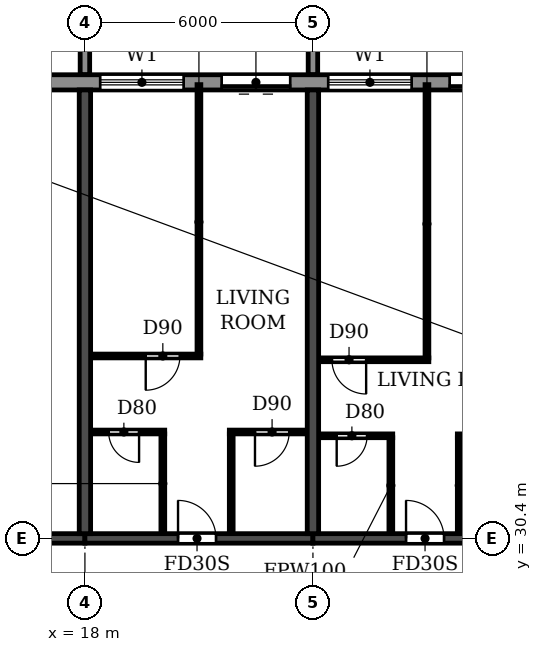
"""IFC4 building model, lengths in metres.
Left out: names, types, materials, properties, quantities, classifications, styles, units other than length and angle.
Written with IfcOpenShell. Run it as: python <this file> out.ifc"""

import sys

from ifc_helpers import new_model, si_unit, direction, frame, frame_2d, origin, place, context, subcontext, project, spatial, polyline, rectangle, outline, extrude, source, transform, mapped, element, fill, save


model = new_model("IFC4")
c1 = context("Model", 3, precision=1e-05, world=origin(), true_north=direction((0.0, 1.0)))
c2 = subcontext(c1, "Body", "Model", "MODEL_VIEW")
j1 = project(units=[si_unit("LENGTHUNIT", "METRE"), si_unit("PLANEANGLEUNIT", "RADIAN")], contexts=[c1])
p1 = place(None, origin())
s1 = spatial("IfcSite", under=j1, at=p1, CompositionType="ELEMENT")
p2 = place(p1, origin())
s2 = spatial("IfcBuilding", under=s1, at=p2, CompositionType="ELEMENT")
p3 = place(p2, frame((0.0, 0.0, 125.7)))
s3 = spatial("IfcBuildingStorey", under=s2, at=p3, CompositionType="ELEMENT", Elevation=125.7)
for number, where, z_axis, x_axis in (
    (1, (18.0, 30.525, 0.0), (0.0, 0.0, 1.0), (0.0, 1.0, 0.0)),
    (2, (24.0, 30.525, 0.0), (0.0, 0.0, 1.0), (0.0, 1.0, 0.0)),
):
    element("IfcWall", number, at=place(p3, frame(where, z_axis=z_axis, x_axis=x_axis)), inside=s3, PredefinedType="SHEAR", context=c2, shape_type="SweptSolid", body=[
        extrude(rectangle(XDim=11.675, YDim=0.3, at=frame_2d((5.837, 0.0))), origin(), (0.0, 0.0, 1.0), 3.07),
    ])
p4 = place(p3, frame((12.2, 30.4, 0.0), z_axis=(0.0, 0.0, 1.0), x_axis=(1.0, 0.0, 0.0)))
e3 = element("IfcWall", 3, at=p4, inside=s3, PredefinedType="SHEAR", context=c2, shape_type="SweptSolid", body=[
    extrude(rectangle(XDim=5.8, YDim=0.25, at=frame_2d((2.9, 0.0))), origin(), (0.0, 0.0, 1.0), 2.47),
])
p5 = place(p4, frame((2.3, 0.0, 0.0)))
e4 = element("IfcOpeningElement", 4, at=p5, cuts=e3, PredefinedType="OPENING", context=c2, shape_type="SweptSolid", body=[
    extrude(rectangle(XDim=1.0, YDim=2.1, at=frame_2d((0.5, 1.05))), frame((0.0, 0.135, 0.0), z_axis=(0.0, -1.0, 0.0), x_axis=(1.0, 0.0, 0.0)), (0.0, 0.0, 1.0), 0.27),
])
p6 = place(p3, frame((18.0, 30.4, 0.0), z_axis=(0.0, 0.0, 1.0), x_axis=(1.0, 0.0, 0.0)))
e5 = element("IfcWall", 5, at=p6, inside=s3, PredefinedType="SHEAR", context=c2, shape_type="SweptSolid", body=[
    extrude(rectangle(XDim=6.0, YDim=0.25, at=frame_2d((3.0, 0.0))), origin(), (0.0, 0.0, 1.0), 2.47),
])
p7 = place(p6, frame((2.45, 0.0, 0.0)))
e6 = element("IfcOpeningElement", 6, at=p7, cuts=e5, PredefinedType="OPENING", context=c2, shape_type="SweptSolid", body=[
    extrude(rectangle(XDim=1.0, YDim=2.1, at=frame_2d((0.5, 1.05))), frame((0.0, 0.135, 0.0), z_axis=(0.0, -1.0, 0.0), x_axis=(1.0, 0.0, 0.0)), (0.0, 0.0, 1.0), 0.27),
])
p8 = place(p3, frame((24.0, 30.4, 0.0), z_axis=(0.0, 0.0, 1.0), x_axis=(1.0, 0.0, 0.0)))
e7 = element("IfcWall", 7, at=p8, inside=s3, PredefinedType="SHEAR", context=c2, shape_type="SweptSolid", body=[
    extrude(rectangle(XDim=6.0, YDim=0.25, at=frame_2d((3.0, 0.0))), origin(), (0.0, 0.0, 1.0), 2.47),
])
p9 = place(p8, frame((2.45, 0.0, 0.0)))
e8 = element("IfcOpeningElement", 8, at=p9, cuts=e7, PredefinedType="OPENING", context=c2, shape_type="SweptSolid", body=[
    extrude(rectangle(XDim=1.0, YDim=2.1, at=frame_2d((0.5, 1.05))), frame((0.0, 0.135, 0.0), z_axis=(0.0, -1.0, 0.0), x_axis=(1.0, 0.0, 0.0)), (0.0, 0.0, 1.0), 0.27),
])
p10 = place(p3, frame((85.317, 42.4, 0.0), z_axis=(0.0, 0.0, 1.0), x_axis=(-1.0, 0.0, 0.0)))
e9 = element("IfcWall", 9, at=p10, inside=s3, PredefinedType="STANDARD", context=c2, shape_type="SweptSolid", body=[
    extrude(rectangle(XDim=68.634, YDim=0.4, at=frame_2d((34.317, 0.0))), origin(), (0.0, 0.0, 1.0), 3.07),
])
p11 = place(p10, frame((64.717, 0.0, 0.9)))
e10 = element("IfcOpeningElement", 10, at=p11, cuts=e9, PredefinedType="OPENING", context=c2, shape_type="SweptSolid", body=[
    extrude(rectangle(XDim=2.2, YDim=1.5, at=frame_2d((1.1, 0.75))), frame((0.0, 0.21, 0.0), z_axis=(0.0, -1.0, 0.0), x_axis=(1.0, 0.0, 0.0)), (0.0, 0.0, 1.0), 0.42),
])
p12 = place(p10, frame((61.917, 0.0, 0.0)))
e11 = element("IfcOpeningElement", 11, at=p12, cuts=e9, PredefinedType="OPENING", context=c2, shape_type="SweptSolid", body=[
    extrude(rectangle(XDim=1.8, YDim=2.4, at=frame_2d((0.9, 1.2))), frame((0.0, 0.21, 0.0), z_axis=(0.0, -1.0, 0.0), x_axis=(1.0, 0.0, 0.0)), (0.0, 0.0, 1.0), 0.42),
])
p13 = place(p10, frame((58.717, 0.0, 0.9)))
e12 = element("IfcOpeningElement", 12, at=p13, cuts=e9, PredefinedType="OPENING", context=c2, shape_type="SweptSolid", body=[
    extrude(rectangle(XDim=2.2, YDim=1.5, at=frame_2d((1.1, 0.75))), frame((0.0, 0.21, 0.0), z_axis=(0.0, -1.0, 0.0), x_axis=(1.0, 0.0, 0.0)), (0.0, 0.0, 1.0), 0.42),
])
p14 = place(p10, frame((55.917, 0.0, 0.0)))
e13 = element("IfcOpeningElement", 13, at=p14, cuts=e9, PredefinedType="OPENING", context=c2, shape_type="SweptSolid", body=[
    extrude(rectangle(XDim=1.8, YDim=2.4, at=frame_2d((0.9, 1.2))), frame((0.0, 0.21, 0.0), z_axis=(0.0, -1.0, 0.0), x_axis=(1.0, 0.0, 0.0)), (0.0, 0.0, 1.0), 0.42),
])
p15 = place(p10, frame((52.717, 0.0, 0.9)))
e14 = element("IfcOpeningElement", 14, at=p15, cuts=e9, PredefinedType="OPENING", context=c2, shape_type="SweptSolid", body=[
    extrude(rectangle(XDim=2.2, YDim=1.5, at=frame_2d((1.1, 0.75))), frame((0.0, 0.21, 0.0), z_axis=(0.0, -1.0, 0.0), x_axis=(1.0, 0.0, 0.0)), (0.0, 0.0, 1.0), 0.42),
])
p16 = place(p10, frame((49.917, 0.0, 0.0)))
e15 = element("IfcOpeningElement", 15, at=p16, cuts=e9, PredefinedType="OPENING", context=c2, shape_type="SweptSolid", body=[
    extrude(rectangle(XDim=1.8, YDim=2.4, at=frame_2d((0.9, 1.2))), frame((0.0, 0.21, 0.0), z_axis=(0.0, -1.0, 0.0), x_axis=(1.0, 0.0, 0.0)), (0.0, 0.0, 1.0), 0.42),
])
p17 = place(p10, frame((46.717, 0.0, 0.9)))
e16 = element("IfcOpeningElement", 16, at=p17, cuts=e9, PredefinedType="OPENING", context=c2, shape_type="SweptSolid", body=[
    extrude(rectangle(XDim=2.2, YDim=1.5, at=frame_2d((1.1, 0.75))), frame((0.0, 0.21, 0.0), z_axis=(0.0, -1.0, 0.0), x_axis=(1.0, 0.0, 0.0)), (0.0, 0.0, 1.0), 0.42),
])
p18 = place(p10, frame((43.917, 0.0, 0.0)))
e17 = element("IfcOpeningElement", 17, at=p18, cuts=e9, PredefinedType="OPENING", context=c2, shape_type="SweptSolid", body=[
    extrude(rectangle(XDim=1.8, YDim=2.4, at=frame_2d((0.9, 1.2))), frame((0.0, 0.21, 0.0), z_axis=(0.0, -1.0, 0.0), x_axis=(1.0, 0.0, 0.0)), (0.0, 0.0, 1.0), 0.42),
])
p19 = place(p10, frame((40.717, 0.0, 0.9)))
e18 = element("IfcOpeningElement", 18, at=p19, cuts=e9, PredefinedType="OPENING", context=c2, shape_type="SweptSolid", body=[
    extrude(rectangle(XDim=2.2, YDim=1.5, at=frame_2d((1.1, 0.75))), frame((0.0, 0.21, 0.0), z_axis=(0.0, -1.0, 0.0), x_axis=(1.0, 0.0, 0.0)), (0.0, 0.0, 1.0), 0.42),
])
p20 = place(p10, frame((37.717, 0.0, 0.9)))
e19 = element("IfcOpeningElement", 19, at=p20, cuts=e9, PredefinedType="OPENING", context=c2, shape_type="SweptSolid", body=[
    extrude(rectangle(XDim=2.2, YDim=1.5, at=frame_2d((1.1, 0.75))), frame((0.0, 0.21, 0.0), z_axis=(0.0, -1.0, 0.0), x_axis=(1.0, 0.0, 0.0)), (0.0, 0.0, 1.0), 0.42),
])
p21 = place(p10, frame((34.917, 0.0, 0.0)))
e20 = element("IfcOpeningElement", 20, at=p21, cuts=e9, PredefinedType="OPENING", context=c2, shape_type="SweptSolid", body=[
    extrude(rectangle(XDim=1.8, YDim=2.4, at=frame_2d((0.9, 1.2))), frame((0.0, 0.21, 0.0), z_axis=(0.0, -1.0, 0.0), x_axis=(1.0, 0.0, 0.0)), (0.0, 0.0, 1.0), 0.42),
])
p22 = place(p10, frame((31.717, 0.0, 0.9)))
e21 = element("IfcOpeningElement", 21, at=p22, cuts=e9, PredefinedType="OPENING", context=c2, shape_type="SweptSolid", body=[
    extrude(rectangle(XDim=2.2, YDim=1.5, at=frame_2d((1.1, 0.75))), frame((0.0, 0.21, 0.0), z_axis=(0.0, -1.0, 0.0), x_axis=(1.0, 0.0, 0.0)), (0.0, 0.0, 1.0), 0.42),
])
p23 = place(p10, frame((28.717, 0.0, 0.9)))
e22 = element("IfcOpeningElement", 22, at=p23, cuts=e9, PredefinedType="OPENING", context=c2, shape_type="SweptSolid", body=[
    extrude(rectangle(XDim=2.2, YDim=1.5, at=frame_2d((1.1, 0.75))), frame((0.0, 0.21, 0.0), z_axis=(0.0, -1.0, 0.0), x_axis=(1.0, 0.0, 0.0)), (0.0, 0.0, 1.0), 0.42),
])
p24 = place(p10, frame((25.717, 0.0, 0.9)))
e23 = element("IfcOpeningElement", 23, at=p24, cuts=e9, PredefinedType="OPENING", context=c2, shape_type="SweptSolid", body=[
    extrude(rectangle(XDim=2.2, YDim=1.5, at=frame_2d((1.1, 0.75))), frame((0.0, 0.21, 0.0), z_axis=(0.0, -1.0, 0.0), x_axis=(1.0, 0.0, 0.0)), (0.0, 0.0, 1.0), 0.42),
])
p25 = place(p10, frame((22.717, 0.0, 0.9)))
e24 = element("IfcOpeningElement", 24, at=p25, cuts=e9, PredefinedType="OPENING", context=c2, shape_type="SweptSolid", body=[
    extrude(rectangle(XDim=2.2, YDim=1.5, at=frame_2d((1.1, 0.75))), frame((0.0, 0.21, 0.0), z_axis=(0.0, -1.0, 0.0), x_axis=(1.0, 0.0, 0.0)), (0.0, 0.0, 1.0), 0.42),
])
p26 = place(p10, frame((19.917, 0.0, 0.0)))
e25 = element("IfcOpeningElement", 25, at=p26, cuts=e9, PredefinedType="OPENING", context=c2, shape_type="SweptSolid", body=[
    extrude(rectangle(XDim=1.8, YDim=2.4, at=frame_2d((0.9, 1.2))), frame((0.0, 0.21, 0.0), z_axis=(0.0, -1.0, 0.0), x_axis=(1.0, 0.0, 0.0)), (0.0, 0.0, 1.0), 0.42),
])
p27 = place(p10, frame((16.917, 0.0, 0.0)))
e26 = element("IfcOpeningElement", 26, at=p27, cuts=e9, PredefinedType="OPENING", context=c2, shape_type="SweptSolid", body=[
    extrude(rectangle(XDim=1.8, YDim=2.4, at=frame_2d((0.9, 1.2))), frame((0.0, 0.21, 0.0), z_axis=(0.0, -1.0, 0.0), x_axis=(1.0, 0.0, 0.0)), (0.0, 0.0, 1.0), 0.42),
])
p28 = place(p10, frame((13.717, 0.0, 0.9)))
e27 = element("IfcOpeningElement", 27, at=p28, cuts=e9, PredefinedType="OPENING", context=c2, shape_type="SweptSolid", body=[
    extrude(rectangle(XDim=2.2, YDim=1.5, at=frame_2d((1.1, 0.75))), frame((0.0, 0.21, 0.0), z_axis=(0.0, -1.0, 0.0), x_axis=(1.0, 0.0, 0.0)), (0.0, 0.0, 1.0), 0.42),
])
p29 = place(p10, frame((10.717, 0.0, 0.9)))
e28 = element("IfcOpeningElement", 28, at=p29, cuts=e9, PredefinedType="OPENING", context=c2, shape_type="SweptSolid", body=[
    extrude(rectangle(XDim=2.2, YDim=1.5, at=frame_2d((1.1, 0.75))), frame((0.0, 0.21, 0.0), z_axis=(0.0, -1.0, 0.0), x_axis=(1.0, 0.0, 0.0)), (0.0, 0.0, 1.0), 0.42),
])
p30 = place(p10, frame((7.717, 0.0, 0.9)))
e29 = element("IfcOpeningElement", 29, at=p30, cuts=e9, PredefinedType="OPENING", context=c2, shape_type="SweptSolid", body=[
    extrude(rectangle(XDim=2.2, YDim=1.5, at=frame_2d((1.1, 0.75))), frame((0.0, 0.21, 0.0), z_axis=(0.0, -1.0, 0.0), x_axis=(1.0, 0.0, 0.0)), (0.0, 0.0, 1.0), 0.42),
])
p31 = place(p10, frame((4.917, 0.0, 0.0)))
e30 = element("IfcOpeningElement", 30, at=p31, cuts=e9, PredefinedType="OPENING", context=c2, shape_type="SweptSolid", body=[
    extrude(rectangle(XDim=1.8, YDim=2.4, at=frame_2d((0.9, 1.2))), frame((0.0, 0.21, 0.0), z_axis=(0.0, -1.0, 0.0), x_axis=(1.0, 0.0, 0.0)), (0.0, 0.0, 1.0), 0.42),
])
p32 = place(p10, frame((1.717, 0.0, 0.9)))
e31 = element("IfcOpeningElement", 31, at=p32, cuts=e9, PredefinedType="OPENING", context=c2, shape_type="SweptSolid", body=[
    extrude(rectangle(XDim=2.2, YDim=1.5, at=frame_2d((1.1, 0.75))), frame((0.0, 0.21, 0.0), z_axis=(0.0, -1.0, 0.0), x_axis=(1.0, 0.0, 0.0)), (0.0, 0.0, 1.0), 0.42),
])
m1 = source(origin(), c2, "Body", "SweptSolid", [
    extrude(outline(polyline([(0.0, 0.0), (0.25, 0.0), (0.25, 3.1), (0.0, 3.1), (0.0, 0.0)])), origin(), (0.0, 0.0, 1.0), 3.1),
])
for number, where in (
    (32, (17.875, 42.6, 0.0)),
    (33, (23.875, 42.6, 0.0)),
):
    element("IfcWall", number, at=place(p3, frame(where)), inside=s3, PredefinedType="STANDARD", context=c2, shape_type="MappedRepresentation", body=[
        mapped(m1, transform((0.0, 0.0, 0.0))),
    ])
p33 = place(p3, frame((24.16, 33.1, 0.0), z_axis=(0.0, 0.0, 1.0), x_axis=(1.0, 0.0, 0.0)))
e34 = element("IfcWall", 34, at=p33, inside=s3, PredefinedType="PARTITIONING", context=c2, shape_type="SweptSolid", body=[
    extrude(rectangle(XDim=1.94, YDim=0.1, at=frame_2d((0.97, 0.0))), origin(), (0.0, 0.0, 1.0), 3.07),
])
p34 = place(p33, frame((0.465, 0.0, 0.0)))
e35 = element("IfcOpeningElement", 35, at=p34, cuts=e34, PredefinedType="OPENING", context=c2, shape_type="SweptSolid", body=[
    extrude(rectangle(XDim=0.8, YDim=2.1, at=frame_2d((0.4, 1.05))), frame((0.0, 0.06, 0.0), z_axis=(0.0, -1.0, 0.0), x_axis=(1.0, 0.0, 0.0)), (0.0, 0.0, 1.0), 0.12),
])
p35 = place(p3, frame((27.8, 33.1, 0.0), z_axis=(0.0, 0.0, 1.0), x_axis=(1.0, 0.0, 0.0)))
e36 = element("IfcWall", 36, at=p35, inside=s3, PredefinedType="PARTITIONING", context=c2, shape_type="SweptSolid", body=[
    extrude(rectangle(XDim=2.04, YDim=0.1, at=frame_2d((1.02, 0.0))), origin(), (0.0, 0.0, 1.0), 3.07),
])
p36 = place(p35, frame((0.675, 0.0, 0.0)))
e37 = element("IfcOpeningElement", 37, at=p36, cuts=e36, PredefinedType="OPENING", context=c2, shape_type="SweptSolid", body=[
    extrude(rectangle(XDim=0.9, YDim=2.1, at=frame_2d((0.45, 1.05))), frame((0.0, 0.06, 0.0), z_axis=(0.0, -1.0, 0.0), x_axis=(1.0, 0.0, 0.0)), (0.0, 0.0, 1.0), 0.12),
])
p37 = place(p3, frame((18.16, 33.2, 0.0), z_axis=(0.0, 0.0, 1.0), x_axis=(1.0, 0.0, 0.0)))
e38 = element("IfcWall", 38, at=p37, inside=s3, PredefinedType="PARTITIONING", context=c2, shape_type="SweptSolid", body=[
    extrude(rectangle(XDim=1.94, YDim=0.1, at=frame_2d((0.97, 0.0))), origin(), (0.0, 0.0, 1.0), 3.07),
])
p38 = place(p37, frame((0.465, 0.0, 0.0)))
e39 = element("IfcOpeningElement", 39, at=p38, cuts=e38, PredefinedType="OPENING", context=c2, shape_type="SweptSolid", body=[
    extrude(rectangle(XDim=0.8, YDim=2.1, at=frame_2d((0.4, 1.05))), frame((0.0, 0.06, 0.0), z_axis=(0.0, -1.0, 0.0), x_axis=(1.0, 0.0, 0.0)), (0.0, 0.0, 1.0), 0.12),
])
p39 = place(p3, frame((21.8, 33.2, 0.0), z_axis=(0.0, 0.0, 1.0), x_axis=(1.0, 0.0, 0.0)))
e40 = element("IfcWall", 40, at=p39, inside=s3, PredefinedType="PARTITIONING", context=c2, shape_type="SweptSolid", body=[
    extrude(rectangle(XDim=2.04, YDim=0.1, at=frame_2d((1.02, 0.0))), origin(), (0.0, 0.0, 1.0), 3.07),
])
p40 = place(p39, frame((0.675, 0.0, 0.0)))
e41 = element("IfcOpeningElement", 41, at=p40, cuts=e40, PredefinedType="OPENING", context=c2, shape_type="SweptSolid", body=[
    extrude(rectangle(XDim=0.9, YDim=2.1, at=frame_2d((0.45, 1.05))), frame((0.0, 0.06, 0.0), z_axis=(0.0, -1.0, 0.0), x_axis=(1.0, 0.0, 0.0)), (0.0, 0.0, 1.0), 0.12),
])
p41 = place(p3, frame((24.16, 35.1, 0.0), z_axis=(0.0, 0.0, 1.0), x_axis=(1.0, 0.0, 0.0)))
e42 = element("IfcWall", 42, at=p41, inside=s3, PredefinedType="PARTITIONING", context=c2, shape_type="SweptSolid", body=[
    extrude(rectangle(XDim=2.89, YDim=0.1, at=frame_2d((1.445, 0.0))), origin(), (0.0, 0.0, 1.0), 3.07),
])
p42 = place(p41, frame((0.34, 0.0, 0.0)))
e43 = element("IfcOpeningElement", 43, at=p42, cuts=e42, PredefinedType="OPENING", context=c2, shape_type="SweptSolid", body=[
    extrude(rectangle(XDim=0.9, YDim=2.1, at=frame_2d((0.45, 1.05))), frame((0.0, 0.06, 0.0), z_axis=(0.0, -1.0, 0.0), x_axis=(1.0, 0.0, 0.0)), (0.0, 0.0, 1.0), 0.12),
])
p43 = place(p3, frame((18.16, 35.2, 0.0), z_axis=(0.0, 0.0, 1.0), x_axis=(1.0, 0.0, 0.0)))
e44 = element("IfcWall", 44, at=p43, inside=s3, PredefinedType="PARTITIONING", context=c2, shape_type="SweptSolid", body=[
    extrude(rectangle(XDim=2.89, YDim=0.1, at=frame_2d((1.445, 0.0))), origin(), (0.0, 0.0, 1.0), 3.07),
])
p44 = place(p43, frame((1.44, 0.0, 0.0)))
e45 = element("IfcOpeningElement", 45, at=p44, cuts=e44, PredefinedType="OPENING", context=c2, shape_type="SweptSolid", body=[
    extrude(rectangle(XDim=0.9, YDim=2.1, at=frame_2d((0.45, 1.05))), frame((0.0, 0.06, 0.0), z_axis=(0.0, -1.0, 0.0), x_axis=(1.0, 0.0, 0.0)), (0.0, 0.0, 1.0), 0.12),
])
p45 = place(p3, frame((20.05, 30.535, 0.0), z_axis=(0.0, 0.0, 1.0), x_axis=(0.0, 1.0, 0.0)))
e46 = element("IfcWall", 46, at=p45, inside=s3, PredefinedType="PARTITIONING", context=c2, shape_type="SweptSolid", body=[
    extrude(rectangle(XDim=2.615, YDim=0.1, at=frame_2d((1.308, 0.0))), origin(), (0.0, 0.0, 1.0), 3.07),
])
p46 = place(p3, frame((21.0, 35.25, 0.0), z_axis=(0.0, 0.0, 1.0), x_axis=(0.0, 1.0, 0.0)))
e47 = element("IfcWall", 47, at=p46, inside=s3, PredefinedType="PARTITIONING", context=c2, shape_type="SweptSolid", body=[
    extrude(rectangle(XDim=7.09, YDim=0.1, at=frame_2d((3.545, 0.0))), origin(), (0.0, 0.0, 1.0), 3.07),
])
p47 = place(p3, frame((21.85, 30.535, 0.0), z_axis=(0.0, 0.0, 1.0), x_axis=(0.0, 1.0, 0.0)))
e48 = element("IfcWall", 48, at=p47, inside=s3, PredefinedType="PARTITIONING", context=c2, shape_type="SweptSolid", body=[
    extrude(rectangle(XDim=2.615, YDim=0.1, at=frame_2d((1.308, 0.0))), origin(), (0.0, 0.0, 1.0), 3.07),
])
p48 = place(p3, frame((26.05, 30.535, 0.0), z_axis=(0.0, 0.0, 1.0), x_axis=(0.0, 1.0, 0.0)))
e49 = element("IfcWall", 49, at=p48, inside=s3, PredefinedType="PARTITIONING", context=c2, shape_type="SweptSolid", body=[
    extrude(rectangle(XDim=2.515, YDim=0.1, at=frame_2d((1.258, 0.0))), origin(), (0.0, 0.0, 1.0), 3.07),
])
p49 = place(p3, frame((27.0, 35.15, 0.0), z_axis=(0.0, 0.0, 1.0), x_axis=(0.0, 1.0, 0.0)))
e50 = element("IfcWall", 50, at=p49, inside=s3, PredefinedType="PARTITIONING", context=c2, shape_type="SweptSolid", body=[
    extrude(rectangle(XDim=7.19, YDim=0.1, at=frame_2d((3.595, 0.0))), origin(), (0.0, 0.0, 1.0), 3.07),
])
p50 = place(p3, frame((27.85, 30.535, 0.0), z_axis=(0.0, 0.0, 1.0), x_axis=(0.0, 1.0, 0.0)))
e51 = element("IfcWall", 51, at=p50, inside=s3, PredefinedType="PARTITIONING", context=c2, shape_type="SweptSolid", body=[
    extrude(rectangle(XDim=2.515, YDim=0.1, at=frame_2d((1.258, 0.0))), origin(), (0.0, 0.0, 1.0), 3.07),
])
p51 = place(p11, origin())
e52 = element("IfcWindow", 52, at=p51, inside=s3, PartitioningType="DOUBLE_PANEL_HORIZONTAL", PredefinedType="WINDOW", context=c2, shape_type="SweptSolid", body=[
    extrude(rectangle(XDim=2.2, YDim=1.5, at=frame_2d((1.1, 0.75))), frame((0.0, 0.03, 0.0), z_axis=(0.0, -1.0, 0.0), x_axis=(1.0, 0.0, 0.0)), (0.0, 0.0, 1.0), 0.06),
])
fill(e10, e52)
p52 = place(p12, origin())
e53 = element("IfcDoor", 53, at=p52, inside=s3, OperationType="DOUBLE_DOOR_SLIDING", PredefinedType="DOOR", context=c2, shape_type="SweptSolid", body=[
    extrude(rectangle(XDim=1.8, YDim=2.4, at=frame_2d((0.9, 1.2))), frame((0.0, 0.025, 0.0), z_axis=(0.0, -1.0, 0.0), x_axis=(1.0, 0.0, 0.0)), (0.0, 0.0, 1.0), 0.05),
])
fill(e11, e53)
p53 = place(p13, origin())
e54 = element("IfcWindow", 54, at=p53, inside=s3, PartitioningType="DOUBLE_PANEL_HORIZONTAL", PredefinedType="WINDOW", context=c2, shape_type="SweptSolid", body=[
    extrude(rectangle(XDim=2.2, YDim=1.5, at=frame_2d((1.1, 0.75))), frame((0.0, 0.03, 0.0), z_axis=(0.0, -1.0, 0.0), x_axis=(1.0, 0.0, 0.0)), (0.0, 0.0, 1.0), 0.06),
])
fill(e12, e54)
p54 = place(p14, origin())
e55 = element("IfcDoor", 55, at=p54, inside=s3, OperationType="DOUBLE_DOOR_SLIDING", PredefinedType="DOOR", context=c2, shape_type="SweptSolid", body=[
    extrude(rectangle(XDim=1.8, YDim=2.4, at=frame_2d((0.9, 1.2))), frame((0.0, 0.025, 0.0), z_axis=(0.0, -1.0, 0.0), x_axis=(1.0, 0.0, 0.0)), (0.0, 0.0, 1.0), 0.05),
])
fill(e13, e55)
p55 = place(p38, frame((0.8, 0.0, 0.0), z_axis=(0.0, 0.0, 1.0), x_axis=(-1.0, 0.0, 0.0)))
e56 = element("IfcDoor", 56, at=p55, inside=s3, OperationType="SINGLE_SWING_LEFT", PredefinedType="DOOR", context=c2, shape_type="SweptSolid", body=[
    extrude(rectangle(XDim=0.8, YDim=2.1, at=frame_2d((0.4, 1.05))), frame((0.0, 0.025, 0.0), z_axis=(0.0, -1.0, 0.0), x_axis=(1.0, 0.0, 0.0)), (0.0, 0.0, 1.0), 0.05),
])
fill(e39, e56)
p56 = place(p44, frame((0.9, 0.0, 0.0), z_axis=(0.0, 0.0, 1.0), x_axis=(-1.0, 0.0, 0.0)))
e57 = element("IfcDoor", 57, at=p56, inside=s3, OperationType="SINGLE_SWING_RIGHT", PredefinedType="DOOR", context=c2, shape_type="SweptSolid", body=[
    extrude(rectangle(XDim=0.9, YDim=2.1, at=frame_2d((0.45, 1.05))), frame((0.0, 0.025, 0.0), z_axis=(0.0, -1.0, 0.0), x_axis=(1.0, 0.0, 0.0)), (0.0, 0.0, 1.0), 0.05),
])
fill(e45, e57)
p57 = place(p7, origin())
e58 = element("IfcDoor", 58, at=p57, inside=s3, OperationType="SINGLE_SWING_LEFT", PredefinedType="DOOR", context=c2, shape_type="SweptSolid", body=[
    extrude(rectangle(XDim=1.0, YDim=2.1, at=frame_2d((0.5, 1.05))), frame((0.0, 0.025, 0.0), z_axis=(0.0, -1.0, 0.0), x_axis=(1.0, 0.0, 0.0)), (0.0, 0.0, 1.0), 0.05),
])
fill(e6, e58)
p58 = place(p40, frame((0.9, 0.0, 0.0), z_axis=(0.0, 0.0, 1.0), x_axis=(-1.0, 0.0, 0.0)))
e59 = element("IfcDoor", 59, at=p58, inside=s3, OperationType="SINGLE_SWING_RIGHT", PredefinedType="DOOR", context=c2, shape_type="SweptSolid", body=[
    extrude(rectangle(XDim=0.9, YDim=2.1, at=frame_2d((0.45, 1.05))), frame((0.0, 0.025, 0.0), z_axis=(0.0, -1.0, 0.0), x_axis=(1.0, 0.0, 0.0)), (0.0, 0.0, 1.0), 0.05),
])
fill(e41, e59)
p59 = place(p42, frame((0.9, 0.0, 0.0), z_axis=(0.0, 0.0, 1.0), x_axis=(-1.0, 0.0, 0.0)))
e60 = element("IfcDoor", 60, at=p59, inside=s3, OperationType="SINGLE_SWING_LEFT", PredefinedType="DOOR", context=c2, shape_type="SweptSolid", body=[
    extrude(rectangle(XDim=0.9, YDim=2.1, at=frame_2d((0.45, 1.05))), frame((0.0, 0.025, 0.0), z_axis=(0.0, -1.0, 0.0), x_axis=(1.0, 0.0, 0.0)), (0.0, 0.0, 1.0), 0.05),
])
fill(e43, e60)
p60 = place(p34, frame((0.8, 0.0, 0.0), z_axis=(0.0, 0.0, 1.0), x_axis=(-1.0, 0.0, 0.0)))
e61 = element("IfcDoor", 61, at=p60, inside=s3, OperationType="SINGLE_SWING_RIGHT", PredefinedType="DOOR", context=c2, shape_type="SweptSolid", body=[
    extrude(rectangle(XDim=0.8, YDim=2.1, at=frame_2d((0.4, 1.05))), frame((0.0, 0.025, 0.0), z_axis=(0.0, -1.0, 0.0), x_axis=(1.0, 0.0, 0.0)), (0.0, 0.0, 1.0), 0.05),
])
fill(e35, e61)
p61 = place(p9, origin())
e62 = element("IfcDoor", 62, at=p61, inside=s3, OperationType="SINGLE_SWING_LEFT", PredefinedType="DOOR", context=c2, shape_type="SweptSolid", body=[
    extrude(rectangle(XDim=1.0, YDim=2.1, at=frame_2d((0.5, 1.05))), frame((0.0, 0.025, 0.0), z_axis=(0.0, -1.0, 0.0), x_axis=(1.0, 0.0, 0.0)), (0.0, 0.0, 1.0), 0.05),
])
fill(e8, e62)
save(model, sys.argv[1])
